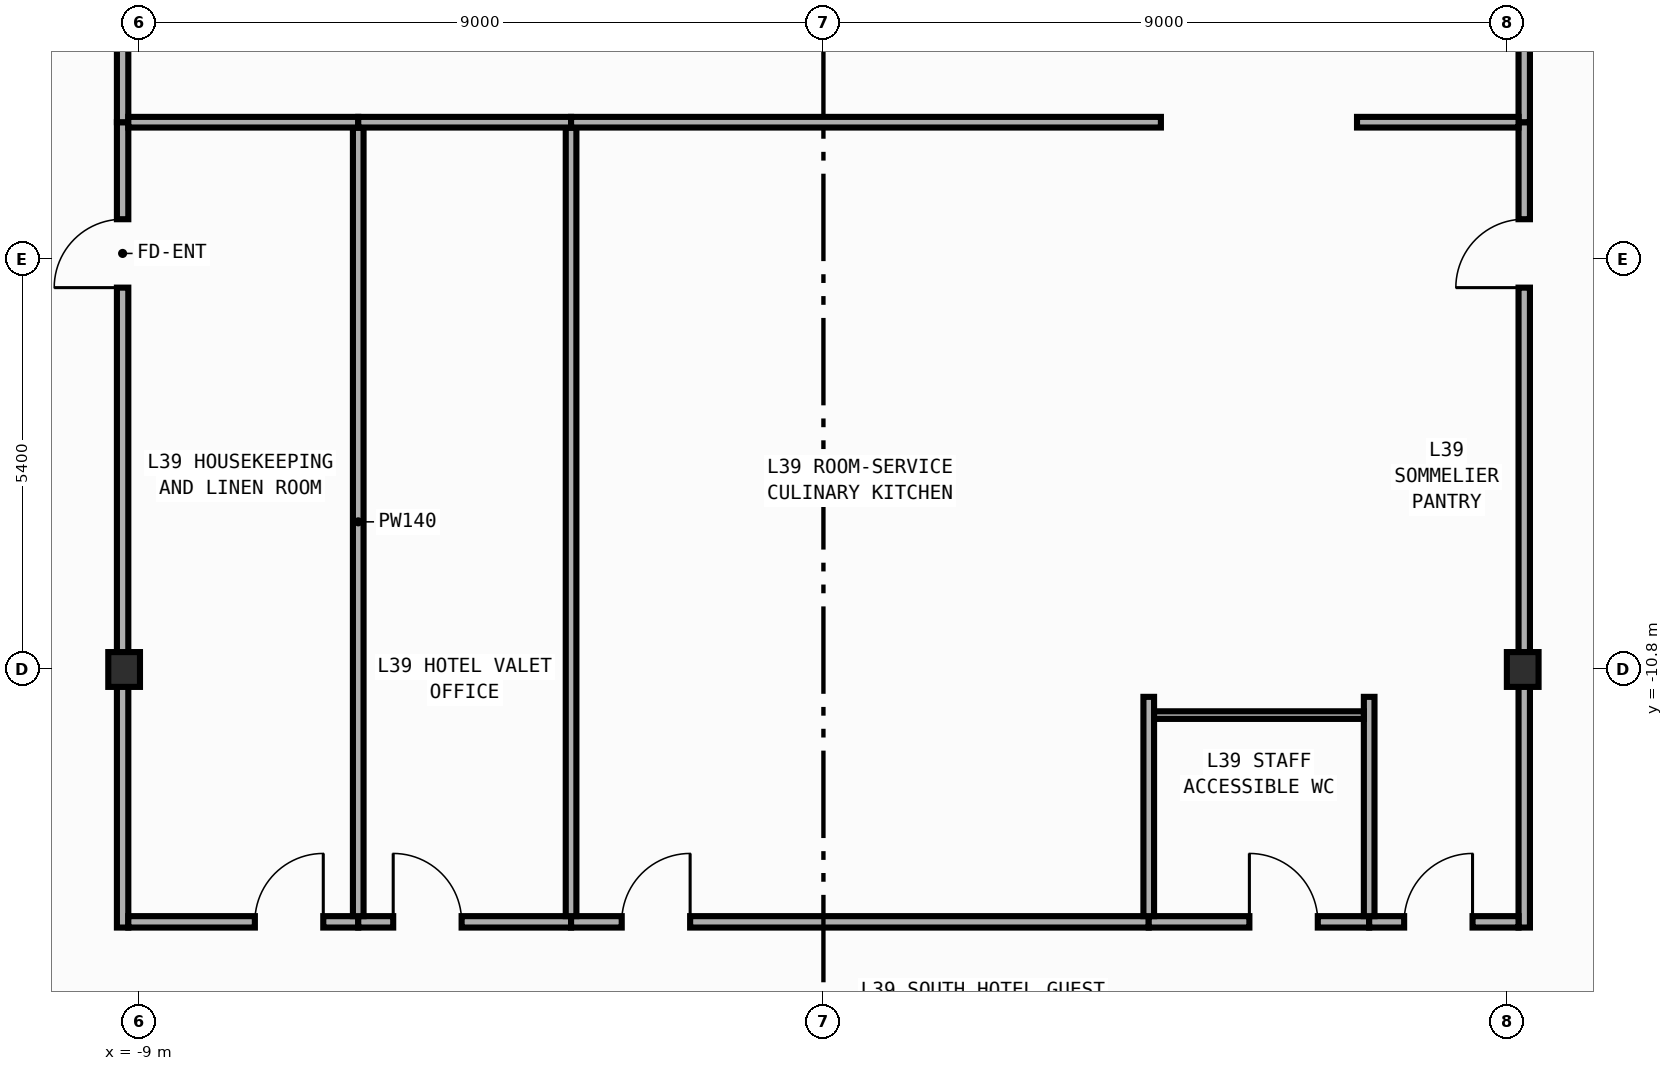
"""IFC4 building model, lengths in metres.
Left out: names, types, materials, properties, quantities, classifications, styles, units other than length and angle.
Written with IfcOpenShell. Run it as: python <this file> out.ifc"""

import sys

from ifc_helpers import new_model, si_unit, direction, frame, frame_2d, origin, origin_2d, place, context, subcontext, project, spatial, rectangle, i_section, extrude, element, fill, save


model = new_model("IFC4")
c1 = context("Model", 3, precision=1e-05, world=origin(), true_north=direction((0.0, 1.0)))
c2 = subcontext(c1, "Body", "Model", "MODEL_VIEW")
j1 = project(units=[si_unit("LENGTHUNIT", "METRE"), si_unit("PLANEANGLEUNIT", "RADIAN")], contexts=[c1])
p1 = place(None, origin())
s1 = spatial("IfcSite", under=j1, at=p1, CompositionType="ELEMENT")
p2 = place(p1, origin())
s2 = spatial("IfcBuilding", under=s1, at=p2, CompositionType="ELEMENT")
p3 = place(p2, frame((0.0, 0.0, 172.6)))
s3 = spatial("IfcBuildingStorey", under=s2, at=p3, CompositionType="ELEMENT", Elevation=172.6)
for number, where, z_axis, x_axis in (
    (1, (-9.2, -10.8, 0.0), (0.0, 0.0, 1.0), (1.0, 0.0, 0.0)),
    (2, (9.2, -10.8, 0.0), (0.0, 0.0, 1.0), (1.0, 0.0, 0.0)),
):
    element("IfcColumn", number, at=place(p3, frame(where, z_axis=z_axis, x_axis=x_axis)), inside=s3, PredefinedType="COLUMN", context=c2, shape_type="SweptSolid", body=[
        extrude(i_section(OverallWidth=0.417, OverallDepth=0.458, WebThickness=0.03, FlangeThickness=0.05, FilletRadius=0.022, at=origin_2d()), origin(), (0.0, 0.0, 1.0), 3.8),
    ])
p4 = place(p3, frame((-9.22, -14.195, 0.0), z_axis=(0.0, 0.0, 1.0), x_axis=(0.0, 1.0, 0.0)))
e3 = element("IfcWall", 3, at=p4, inside=s3, PredefinedType="PARTITIONING", context=c2, shape_type="SweptSolid", body=[
    extrude(rectangle(XDim=10.595, YDim=0.15, at=frame_2d((5.297, 0.0))), origin(), (0.0, 0.0, 1.0), 2.952),
])
p5 = place(p4, frame((8.419, 0.0, 0.0)))
e4 = element("IfcOpeningElement", 4, at=p5, cuts=e3, PredefinedType="OPENING", context=c2, shape_type="SweptSolid", body=[
    extrude(rectangle(XDim=0.9, YDim=2.15, at=frame_2d((0.45, 1.075))), frame((0.0, 0.085, 0.0), z_axis=(0.0, -1.0, 0.0), x_axis=(1.0, 0.0, 0.0)), (0.0, 0.0, 1.0), 0.17),
])
p6 = place(p3, frame((-9.22, -3.6, 0.0), z_axis=(0.0, 0.0, 1.0), x_axis=(0.0, 1.0, 0.0)))
e5 = element("IfcWall", 5, at=p6, inside=s3, PredefinedType="PARTITIONING", context=c2, shape_type="SweptSolid", body=[
    extrude(rectangle(XDim=19.195, YDim=0.15, at=frame_2d((9.598, 0.0))), origin(), (0.0, 0.0, 1.0), 2.952),
])
p7 = place(p6, frame((8.542, 0.0, 0.0)))
e6 = element("IfcOpeningElement", 6, at=p7, cuts=e5, PredefinedType="OPENING", context=c2, shape_type="SweptSolid", body=[
    extrude(rectangle(XDim=0.9, YDim=2.15, at=frame_2d((0.45, 1.075))), frame((0.0, 0.085, 0.0), z_axis=(0.0, -1.0, 0.0), x_axis=(1.0, 0.0, 0.0)), (0.0, 0.0, 1.0), 0.17),
])
p8 = place(p3, frame((9.22, -14.195, 0.0), z_axis=(0.0, 0.0, 1.0), x_axis=(0.0, 1.0, 0.0)))
e7 = element("IfcWall", 7, at=p8, inside=s3, PredefinedType="PARTITIONING", context=c2, shape_type="SweptSolid", body=[
    extrude(rectangle(XDim=10.595, YDim=0.15, at=frame_2d((5.297, 0.0))), origin(), (0.0, 0.0, 1.0), 2.952),
])
p9 = place(p8, frame((8.419, 0.0, 0.0)))
e8 = element("IfcOpeningElement", 8, at=p9, cuts=e7, PredefinedType="OPENING", context=c2, shape_type="SweptSolid", body=[
    extrude(rectangle(XDim=0.9, YDim=2.15, at=frame_2d((0.45, 1.075))), frame((0.0, 0.085, 0.0), z_axis=(0.0, -1.0, 0.0), x_axis=(1.0, 0.0, 0.0)), (0.0, 0.0, 1.0), 0.17),
])
p10 = place(p3, frame((9.22, -3.6, 0.0), z_axis=(0.0, 0.0, 1.0), x_axis=(0.0, 1.0, 0.0)))
e9 = element("IfcWall", 9, at=p10, inside=s3, PredefinedType="PARTITIONING", context=c2, shape_type="SweptSolid", body=[
    extrude(rectangle(XDim=19.195, YDim=0.15, at=frame_2d((9.598, 0.0))), origin(), (0.0, 0.0, 1.0), 2.952),
])
p11 = place(p10, frame((8.542, 0.0, 0.0)))
e10 = element("IfcOpeningElement", 10, at=p11, cuts=e9, PredefinedType="OPENING", context=c2, shape_type="SweptSolid", body=[
    extrude(rectangle(XDim=0.9, YDim=2.15, at=frame_2d((0.45, 1.075))), frame((0.0, 0.085, 0.0), z_axis=(0.0, -1.0, 0.0), x_axis=(1.0, 0.0, 0.0)), (0.0, 0.0, 1.0), 0.17),
])
p12 = place(p3, frame((-9.145, -14.12, 0.0), z_axis=(0.0, 0.0, 1.0), x_axis=(1.0, 0.0, 0.0)))
e11 = element("IfcWall", 11, at=p12, inside=s3, PredefinedType="PARTITIONING", context=c2, shape_type="SweptSolid", body=[
    extrude(rectangle(XDim=3.025, YDim=0.15, at=frame_2d((1.512, 0.0))), origin(), (0.0, 0.0, 1.0), 3.54),
])
p13 = place(p12, frame((1.665, 0.0, 0.0)))
e12 = element("IfcOpeningElement", 12, at=p13, cuts=e11, PredefinedType="OPENING", context=c2, shape_type="SweptSolid", body=[
    extrude(rectangle(XDim=0.9, YDim=2.15, at=frame_2d((0.45, 1.075))), frame((0.0, 0.085, 0.0), z_axis=(0.0, -1.0, 0.0), x_axis=(1.0, 0.0, 0.0)), (0.0, 0.0, 1.0), 0.17),
])
p14 = place(p3, frame((-6.12, -14.12, 0.0), z_axis=(0.0, 0.0, 1.0), x_axis=(1.0, 0.0, 0.0)))
e13 = element("IfcWall", 13, at=p14, inside=s3, PredefinedType="PARTITIONING", context=c2, shape_type="SweptSolid", body=[
    extrude(rectangle(XDim=2.8, YDim=0.15, at=frame_2d((1.4, 0.0))), origin(), (0.0, 0.0, 1.0), 3.54),
])
p15 = place(p14, frame((0.46, 0.0, 0.0)))
e14 = element("IfcOpeningElement", 14, at=p15, cuts=e13, PredefinedType="OPENING", context=c2, shape_type="SweptSolid", body=[
    extrude(rectangle(XDim=0.9, YDim=2.15, at=frame_2d((0.45, 1.075))), frame((0.0, 0.085, 0.0), z_axis=(0.0, -1.0, 0.0), x_axis=(1.0, 0.0, 0.0)), (0.0, 0.0, 1.0), 0.17),
])
p16 = place(p3, frame((-3.32, -14.12, 0.0), z_axis=(0.0, 0.0, 1.0), x_axis=(1.0, 0.0, 0.0)))
e15 = element("IfcWall", 15, at=p16, inside=s3, PredefinedType="PARTITIONING", context=c2, shape_type="SweptSolid", body=[
    extrude(rectangle(XDim=7.6, YDim=0.15, at=frame_2d((3.8, 0.0))), origin(), (0.0, 0.0, 1.0), 3.54),
])
p17 = place(p16, frame((0.667, 0.0, 0.0)))
e16 = element("IfcOpeningElement", 16, at=p17, cuts=e15, PredefinedType="OPENING", context=c2, shape_type="SweptSolid", body=[
    extrude(rectangle(XDim=0.9, YDim=2.15, at=frame_2d((0.45, 1.075))), frame((0.0, 0.085, 0.0), z_axis=(0.0, -1.0, 0.0), x_axis=(1.0, 0.0, 0.0)), (0.0, 0.0, 1.0), 0.17),
])
p18 = place(p3, frame((4.28, -14.12, 0.0), z_axis=(0.0, 0.0, 1.0), x_axis=(1.0, 0.0, 0.0)))
e17 = element("IfcWall", 17, at=p18, inside=s3, PredefinedType="PARTITIONING", context=c2, shape_type="SweptSolid", body=[
    extrude(rectangle(XDim=2.9, YDim=0.15, at=frame_2d((1.45, 0.0))), origin(), (0.0, 0.0, 1.0), 3.54),
])
p19 = place(p18, frame((1.324, 0.0, 0.0)))
e18 = element("IfcOpeningElement", 18, at=p19, cuts=e17, PredefinedType="OPENING", context=c2, shape_type="SweptSolid", body=[
    extrude(rectangle(XDim=0.9, YDim=2.15, at=frame_2d((0.45, 1.075))), frame((0.0, 0.085, 0.0), z_axis=(0.0, -1.0, 0.0), x_axis=(1.0, 0.0, 0.0)), (0.0, 0.0, 1.0), 0.17),
])
p20 = place(p3, frame((7.18, -14.12, 0.0), z_axis=(0.0, 0.0, 1.0), x_axis=(1.0, 0.0, 0.0)))
e19 = element("IfcWall", 19, at=p20, inside=s3, PredefinedType="PARTITIONING", context=c2, shape_type="SweptSolid", body=[
    extrude(rectangle(XDim=1.965, YDim=0.15, at=frame_2d((0.982, 0.0))), origin(), (0.0, 0.0, 1.0), 3.54),
])
p21 = place(p20, frame((0.46, 0.0, 0.0)))
e20 = element("IfcOpeningElement", 20, at=p21, cuts=e19, PredefinedType="OPENING", context=c2, shape_type="SweptSolid", body=[
    extrude(rectangle(XDim=0.9, YDim=2.15, at=frame_2d((0.45, 1.075))), frame((0.0, 0.085, 0.0), z_axis=(0.0, -1.0, 0.0), x_axis=(1.0, 0.0, 0.0)), (0.0, 0.0, 1.0), 0.17),
])
p22 = place(p3, frame((-6.12, -14.045, 0.0), z_axis=(0.0, 0.0, 1.0), x_axis=(0.0, 1.0, 0.0)))
e21 = element("IfcWall", 21, at=p22, inside=s3, PredefinedType="PARTITIONING", context=c2, shape_type="SweptSolid", body=[
    extrude(rectangle(XDim=10.375, YDim=0.14, at=frame_2d((5.188, 0.0))), origin(), (0.0, 0.0, 1.0), 3.54),
])
p23 = place(p3, frame((-9.145, -3.6, 0.0), z_axis=(0.0, 0.0, 1.0), x_axis=(1.0, 0.0, 0.0)))
e22 = element("IfcWall", 22, at=p23, inside=s3, PredefinedType="PARTITIONING", context=c2, shape_type="SweptSolid", body=[
    extrude(rectangle(XDim=3.025, YDim=0.14, at=frame_2d((1.512, 0.0))), origin(), (0.0, 0.0, 1.0), 3.54),
])
p24 = place(p3, frame((-3.32, -14.045, 0.0), z_axis=(0.0, 0.0, 1.0), x_axis=(0.0, 1.0, 0.0)))
e23 = element("IfcWall", 23, at=p24, inside=s3, PredefinedType="PARTITIONING", context=c2, shape_type="SweptSolid", body=[
    extrude(rectangle(XDim=10.375, YDim=0.14, at=frame_2d((5.188, 0.0))), origin(), (0.0, 0.0, 1.0), 3.54),
])
p25 = place(p3, frame((-6.12, -3.6, 0.0), z_axis=(0.0, 0.0, 1.0), x_axis=(1.0, 0.0, 0.0)))
e24 = element("IfcWall", 24, at=p25, inside=s3, PredefinedType="PARTITIONING", context=c2, shape_type="SweptSolid", body=[
    extrude(rectangle(XDim=2.8, YDim=0.14, at=frame_2d((1.4, 0.0))), origin(), (0.0, 0.0, 1.0), 3.54),
])
p26 = place(p3, frame((4.28, -14.045, 0.0), z_axis=(0.0, 0.0, 1.0), x_axis=(0.0, 1.0, 0.0)))
e25 = element("IfcWall", 25, at=p26, inside=s3, PredefinedType="PARTITIONING", context=c2, shape_type="SweptSolid", body=[
    extrude(rectangle(XDim=2.885, YDim=0.14, at=frame_2d((1.442, 0.0))), origin(), (0.0, 0.0, 1.0), 3.54),
])
p27 = place(p3, frame((-3.32, -3.6, 0.0), z_axis=(0.0, 0.0, 1.0), x_axis=(1.0, 0.0, 0.0)))
e26 = element("IfcWall", 26, at=p27, inside=s3, PredefinedType="PARTITIONING", context=c2, shape_type="SweptSolid", body=[
    extrude(rectangle(XDim=7.76, YDim=0.14, at=frame_2d((3.88, 0.0))), origin(), (0.0, 0.0, 1.0), 3.54),
])
p28 = place(p3, frame((7.18, -14.045, 0.0), z_axis=(0.0, 0.0, 1.0), x_axis=(0.0, 1.0, 0.0)))
e27 = element("IfcWall", 27, at=p28, inside=s3, PredefinedType="PARTITIONING", context=c2, shape_type="SweptSolid", body=[
    extrude(rectangle(XDim=2.885, YDim=0.14, at=frame_2d((1.442, 0.0))), origin(), (0.0, 0.0, 1.0), 3.54),
])
p29 = place(p3, frame((7.02, -3.6, 0.0), z_axis=(0.0, 0.0, 1.0), x_axis=(1.0, 0.0, 0.0)))
e28 = element("IfcWall", 28, at=p29, inside=s3, PredefinedType="PARTITIONING", context=c2, shape_type="SweptSolid", body=[
    extrude(rectangle(XDim=2.125, YDim=0.14, at=frame_2d((1.062, 0.0))), origin(), (0.0, 0.0, 1.0), 3.54),
])
p30 = place(p3, frame((4.35, -11.4, 0.0), z_axis=(0.0, 0.0, 1.0), x_axis=(1.0, 0.0, 0.0)))
e29 = element("IfcWall", 29, at=p30, inside=s3, PredefinedType="PARTITIONING", context=c2, shape_type="SweptSolid", body=[
    extrude(rectangle(XDim=2.76, YDim=0.1, at=frame_2d((1.38, 0.0))), origin(), (0.0, 0.0, 1.0), 3.54),
])
p31 = place(p5, origin())
e30 = element("IfcDoor", 30, at=p31, inside=s3, OperationType="SINGLE_SWING_LEFT", PredefinedType="DOOR", context=c2, shape_type="SweptSolid", body=[
    extrude(rectangle(XDim=0.9, YDim=2.15, at=frame_2d((0.45, 1.075))), frame((0.0, 0.025, 0.0), z_axis=(0.0, -1.0, 0.0), x_axis=(1.0, 0.0, 0.0)), (0.0, 0.0, 1.0), 0.05),
])
fill(e4, e30)
p32 = place(p9, origin())
e31 = element("IfcDoor", 31, at=p32, inside=s3, OperationType="SINGLE_SWING_LEFT", PredefinedType="DOOR", context=c2, shape_type="SweptSolid", body=[
    extrude(rectangle(XDim=0.9, YDim=2.15, at=frame_2d((0.45, 1.075))), frame((0.0, 0.025, 0.0), z_axis=(0.0, -1.0, 0.0), x_axis=(1.0, 0.0, 0.0)), (0.0, 0.0, 1.0), 0.05),
])
fill(e8, e31)
p33 = place(p13, origin())
e32 = element("IfcDoor", 32, at=p33, inside=s3, OperationType="SINGLE_SWING_RIGHT", PredefinedType="DOOR", context=c2, shape_type="SweptSolid", body=[
    extrude(rectangle(XDim=0.9, YDim=2.15, at=frame_2d((0.45, 1.075))), frame((0.0, 0.025, 0.0), z_axis=(0.0, -1.0, 0.0), x_axis=(1.0, 0.0, 0.0)), (0.0, 0.0, 1.0), 0.05),
])
fill(e12, e32)
p34 = place(p15, origin())
e33 = element("IfcDoor", 33, at=p34, inside=s3, OperationType="SINGLE_SWING_LEFT", PredefinedType="DOOR", context=c2, shape_type="SweptSolid", body=[
    extrude(rectangle(XDim=0.9, YDim=2.15, at=frame_2d((0.45, 1.075))), frame((0.0, 0.025, 0.0), z_axis=(0.0, -1.0, 0.0), x_axis=(1.0, 0.0, 0.0)), (0.0, 0.0, 1.0), 0.05),
])
fill(e14, e33)
p35 = place(p17, origin())
e34 = element("IfcDoor", 34, at=p35, inside=s3, OperationType="SINGLE_SWING_RIGHT", PredefinedType="DOOR", context=c2, shape_type="SweptSolid", body=[
    extrude(rectangle(XDim=0.9, YDim=2.15, at=frame_2d((0.45, 1.075))), frame((0.0, 0.025, 0.0), z_axis=(0.0, -1.0, 0.0), x_axis=(1.0, 0.0, 0.0)), (0.0, 0.0, 1.0), 0.05),
])
fill(e16, e34)
p36 = place(p19, origin())
e35 = element("IfcDoor", 35, at=p36, inside=s3, OperationType="SINGLE_SWING_LEFT", PredefinedType="DOOR", context=c2, shape_type="SweptSolid", body=[
    extrude(rectangle(XDim=0.9, YDim=2.15, at=frame_2d((0.45, 1.075))), frame((0.0, 0.025, 0.0), z_axis=(0.0, -1.0, 0.0), x_axis=(1.0, 0.0, 0.0)), (0.0, 0.0, 1.0), 0.05),
])
fill(e18, e35)
p37 = place(p21, origin())
e36 = element("IfcDoor", 36, at=p37, inside=s3, OperationType="SINGLE_SWING_RIGHT", PredefinedType="DOOR", context=c2, shape_type="SweptSolid", body=[
    extrude(rectangle(XDim=0.9, YDim=2.15, at=frame_2d((0.45, 1.075))), frame((0.0, 0.025, 0.0), z_axis=(0.0, -1.0, 0.0), x_axis=(1.0, 0.0, 0.0)), (0.0, 0.0, 1.0), 0.05),
])
fill(e20, e36)
save(model, sys.argv[1])
